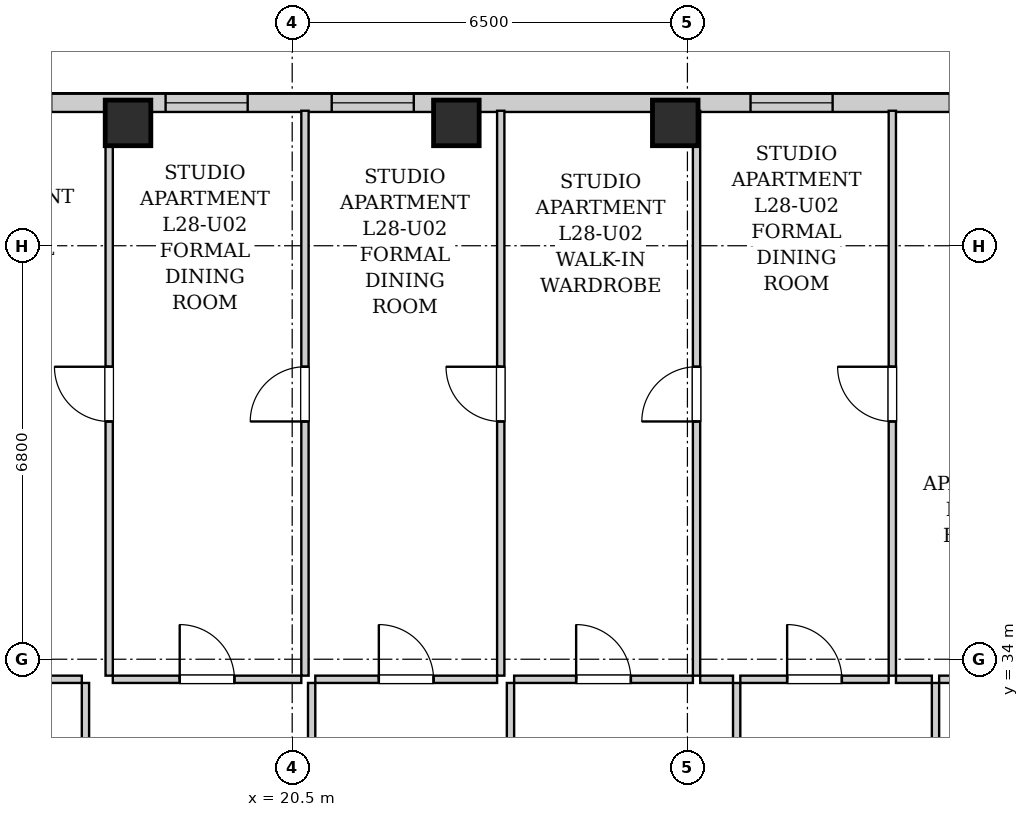
"""IFC4 building model, lengths in metres.
Left out: names, types, materials, properties, quantities, classifications, styles, units other than length and angle.
Written with IfcOpenShell. Run it as: python <this file> out.ifc"""

import sys

from ifc_helpers import new_model, si_unit, direction, frame, frame_2d, origin, origin_2d, place, context, subcontext, project, spatial, rectangle, extrude, element, fill, save


model = new_model("IFC4")
c1 = context("Model", 3, precision=1e-05, world=origin(), true_north=direction((0.0, 1.0)))
c2 = subcontext(c1, "Body", "Model", "MODEL_VIEW")
j1 = project(units=[si_unit("LENGTHUNIT", "METRE"), si_unit("PLANEANGLEUNIT", "RADIAN")], contexts=[c1])
p1 = place(None, origin())
s1 = spatial("IfcSite", under=j1, at=p1, CompositionType="ELEMENT")
p2 = place(p1, origin())
s2 = spatial("IfcBuilding", under=s1, at=p2, CompositionType="ELEMENT")
p3 = place(p2, frame((0.0, 0.0, 100.7)))
s3 = spatial("IfcBuildingStorey", under=s2, at=p3, CompositionType="ELEMENT", Elevation=100.7)
for number, where, z_axis, x_axis in (
    (1, (17.8, 42.82, 0.0), (0.0, 0.0, 1.0), (1.0, 0.0, 0.0)),
    (2, (23.2, 42.82, 0.0), (0.0, 0.0, 1.0), (1.0, 0.0, 0.0)),
    (3, (26.8, 42.82, 0.0), (0.0, 0.0, 1.0), (1.0, 0.0, 0.0)),
):
    element("IfcColumn", number, at=place(p3, frame(where, z_axis=z_axis, x_axis=x_axis)), inside=s3, PredefinedType="COLUMN", context=c2, shape_type="SweptSolid", body=[
        extrude(rectangle(XDim=0.75, YDim=0.75, at=origin_2d()), origin(), (0.0, 0.0, 1.0), 3.2),
    ])
p4 = place(p3, frame((10.0, 43.15, 0.0), z_axis=(0.0, 0.0, 1.0), x_axis=(1.0, 0.0, 0.0)))
e4 = element("IfcWall", 4, at=p4, inside=s3, PredefinedType="SOLIDWALL", context=c2, shape_type="SweptSolid", body=[
    extrude(rectangle(XDim=24.35, YDim=0.3, at=frame_2d((12.175, 0.0))), origin(), (0.0, 0.0, 1.0), 2.94),
])
p5 = place(p4, frame((1.956, 0.0, 0.55)))
e5 = element("IfcOpeningElement", 5, at=p5, cuts=e4, PredefinedType="OPENING", context=c2, shape_type="SweptSolid", body=[
    extrude(rectangle(XDim=1.35, YDim=1.2, at=frame_2d((0.675, 0.6))), frame((0.0, 0.16, 0.0), z_axis=(0.0, -1.0, 0.0), x_axis=(1.0, 0.0, 0.0)), (0.0, 0.0, 1.0), 0.32),
])
p6 = place(p4, frame((5.187, 0.0, 0.55)))
e6 = element("IfcOpeningElement", 6, at=p6, cuts=e4, PredefinedType="OPENING", context=c2, shape_type="SweptSolid", body=[
    extrude(rectangle(XDim=1.35, YDim=1.2, at=frame_2d((0.675, 0.6))), frame((0.0, 0.16, 0.0), z_axis=(0.0, -1.0, 0.0), x_axis=(1.0, 0.0, 0.0)), (0.0, 0.0, 1.0), 0.32),
])
p7 = place(p4, frame((8.418, 0.0, 0.55)))
e7 = element("IfcOpeningElement", 7, at=p7, cuts=e4, PredefinedType="OPENING", context=c2, shape_type="SweptSolid", body=[
    extrude(rectangle(XDim=1.35, YDim=1.2, at=frame_2d((0.675, 0.6))), frame((0.0, 0.16, 0.0), z_axis=(0.0, -1.0, 0.0), x_axis=(1.0, 0.0, 0.0)), (0.0, 0.0, 1.0), 0.32),
])
p8 = place(p4, frame((11.15, 0.0, 0.55)))
e8 = element("IfcOpeningElement", 8, at=p8, cuts=e4, PredefinedType="OPENING", context=c2, shape_type="SweptSolid", body=[
    extrude(rectangle(XDim=1.35, YDim=1.2, at=frame_2d((0.675, 0.6))), frame((0.0, 0.16, 0.0), z_axis=(0.0, -1.0, 0.0), x_axis=(1.0, 0.0, 0.0)), (0.0, 0.0, 1.0), 0.32),
])
p9 = place(p4, frame((18.038, 0.0, 0.55)))
e9 = element("IfcOpeningElement", 9, at=p9, cuts=e4, PredefinedType="OPENING", context=c2, shape_type="SweptSolid", body=[
    extrude(rectangle(XDim=1.35, YDim=1.2, at=frame_2d((0.675, 0.6))), frame((0.0, 0.16, 0.0), z_axis=(0.0, -1.0, 0.0), x_axis=(1.0, 0.0, 0.0)), (0.0, 0.0, 1.0), 0.32),
])
p10 = place(p4, frame((21.315, 0.0, 0.55)))
e10 = element("IfcOpeningElement", 10, at=p10, cuts=e4, PredefinedType="OPENING", context=c2, shape_type="SweptSolid", body=[
    extrude(rectangle(XDim=1.35, YDim=1.2, at=frame_2d((0.675, 0.6))), frame((0.0, 0.16, 0.0), z_axis=(0.0, -1.0, 0.0), x_axis=(1.0, 0.0, 0.0)), (0.0, 0.0, 1.0), 0.32),
])
p11 = place(p3, frame((17.1, 30.76, 0.0), z_axis=(0.0, 0.0, 1.0), x_axis=(0.0, 1.0, 0.0)))
e11 = element("IfcWall", 11, at=p11, inside=s3, PredefinedType="PARTITIONING", context=c2, shape_type="SweptSolid", body=[
    extrude(rectangle(XDim=2.85, YDim=0.12, at=frame_2d((1.425, 0.0))), origin(), (0.0, 0.0, 1.0), 2.94),
])
p12 = place(p11, frame((0.975, 0.0, 0.0)))
e12 = element("IfcOpeningElement", 12, at=p12, cuts=e11, PredefinedType="OPENING", context=c2, shape_type="SweptSolid", body=[
    extrude(rectangle(XDim=0.9, YDim=2.05, at=frame_2d((0.45, 1.025))), frame((0.0, 0.07, 0.0), z_axis=(0.0, -1.0, 0.0), x_axis=(1.0, 0.0, 0.0)), (0.0, 0.0, 1.0), 0.14),
])
p13 = place(p3, frame((14.33, 33.67, 0.0), z_axis=(0.0, 0.0, 1.0), x_axis=(1.0, 0.0, 0.0)))
e13 = element("IfcWall", 13, at=p13, inside=s3, PredefinedType="PARTITIONING", context=c2, shape_type="SweptSolid", body=[
    extrude(rectangle(XDim=2.71, YDim=0.12, at=frame_2d((1.355, 0.0))), origin(), (0.0, 0.0, 1.0), 2.94),
])
p14 = place(p13, frame((0.905, 0.0, 0.0)))
e14 = element("IfcOpeningElement", 14, at=p14, cuts=e13, PredefinedType="OPENING", context=c2, shape_type="SweptSolid", body=[
    extrude(rectangle(XDim=0.9, YDim=2.05, at=frame_2d((0.45, 1.025))), frame((0.0, 0.07, 0.0), z_axis=(0.0, -1.0, 0.0), x_axis=(1.0, 0.0, 0.0)), (0.0, 0.0, 1.0), 0.14),
])
p15 = place(p3, frame((20.82, 30.76, 0.0), z_axis=(0.0, 0.0, 1.0), x_axis=(0.0, 1.0, 0.0)))
e15 = element("IfcWall", 15, at=p15, inside=s3, PredefinedType="PARTITIONING", context=c2, shape_type="SweptSolid", body=[
    extrude(rectangle(XDim=2.85, YDim=0.12, at=frame_2d((1.425, 0.0))), origin(), (0.0, 0.0, 1.0), 2.94),
])
p16 = place(p15, frame((0.975, 0.0, 0.0)))
e16 = element("IfcOpeningElement", 16, at=p16, cuts=e15, PredefinedType="OPENING", context=c2, shape_type="SweptSolid", body=[
    extrude(rectangle(XDim=0.9, YDim=2.05, at=frame_2d((0.45, 1.025))), frame((0.0, 0.07, 0.0), z_axis=(0.0, -1.0, 0.0), x_axis=(1.0, 0.0, 0.0)), (0.0, 0.0, 1.0), 0.14),
])
p17 = place(p3, frame((17.55, 33.67, 0.0), z_axis=(0.0, 0.0, 1.0), x_axis=(1.0, 0.0, 0.0)))
e17 = element("IfcWall", 17, at=p17, inside=s3, PredefinedType="PARTITIONING", context=c2, shape_type="SweptSolid", body=[
    extrude(rectangle(XDim=3.1, YDim=0.12, at=frame_2d((1.55, 0.0))), origin(), (0.0, 0.0, 1.0), 2.94),
])
p18 = place(p17, frame((1.1, 0.0, 0.0)))
e18 = element("IfcOpeningElement", 18, at=p18, cuts=e17, PredefinedType="OPENING", context=c2, shape_type="SweptSolid", body=[
    extrude(rectangle(XDim=0.9, YDim=2.05, at=frame_2d((0.45, 1.025))), frame((0.0, 0.07, 0.0), z_axis=(0.0, -1.0, 0.0), x_axis=(1.0, 0.0, 0.0)), (0.0, 0.0, 1.0), 0.14),
])
p19 = place(p3, frame((24.09, 30.76, 0.0), z_axis=(0.0, 0.0, 1.0), x_axis=(0.0, 1.0, 0.0)))
e19 = element("IfcWall", 19, at=p19, inside=s3, PredefinedType="PARTITIONING", context=c2, shape_type="SweptSolid", body=[
    extrude(rectangle(XDim=2.85, YDim=0.12, at=frame_2d((1.425, 0.0))), origin(), (0.0, 0.0, 1.0), 2.94),
])
p20 = place(p19, frame((0.975, 0.0, 0.0)))
e20 = element("IfcOpeningElement", 20, at=p20, cuts=e19, PredefinedType="OPENING", context=c2, shape_type="SweptSolid", body=[
    extrude(rectangle(XDim=0.9, YDim=2.05, at=frame_2d((0.45, 1.025))), frame((0.0, 0.07, 0.0), z_axis=(0.0, -1.0, 0.0), x_axis=(1.0, 0.0, 0.0)), (0.0, 0.0, 1.0), 0.14),
])
p21 = place(p3, frame((20.88, 33.67, 0.0), z_axis=(0.0, 0.0, 1.0), x_axis=(1.0, 0.0, 0.0)))
e21 = element("IfcWall", 21, at=p21, inside=s3, PredefinedType="PARTITIONING", context=c2, shape_type="SweptSolid", body=[
    extrude(rectangle(XDim=2.99, YDim=0.12, at=frame_2d((1.495, 0.0))), origin(), (0.0, 0.0, 1.0), 2.94),
])
p22 = place(p21, frame((1.045, 0.0, 0.0)))
e22 = element("IfcOpeningElement", 22, at=p22, cuts=e21, PredefinedType="OPENING", context=c2, shape_type="SweptSolid", body=[
    extrude(rectangle(XDim=0.9, YDim=2.05, at=frame_2d((0.45, 1.025))), frame((0.0, 0.07, 0.0), z_axis=(0.0, -1.0, 0.0), x_axis=(1.0, 0.0, 0.0)), (0.0, 0.0, 1.0), 0.14),
])
p23 = place(p3, frame((27.81, 30.76, 0.0), z_axis=(0.0, 0.0, 1.0), x_axis=(0.0, 1.0, 0.0)))
e23 = element("IfcWall", 23, at=p23, inside=s3, PredefinedType="PARTITIONING", context=c2, shape_type="SweptSolid", body=[
    extrude(rectangle(XDim=2.85, YDim=0.12, at=frame_2d((1.425, 0.0))), origin(), (0.0, 0.0, 1.0), 2.94),
])
p24 = place(p23, frame((0.975, 0.0, 0.0)))
e24 = element("IfcOpeningElement", 24, at=p24, cuts=e23, PredefinedType="OPENING", context=c2, shape_type="SweptSolid", body=[
    extrude(rectangle(XDim=0.9, YDim=2.05, at=frame_2d((0.45, 1.025))), frame((0.0, 0.07, 0.0), z_axis=(0.0, -1.0, 0.0), x_axis=(1.0, 0.0, 0.0)), (0.0, 0.0, 1.0), 0.14),
])
p25 = place(p3, frame((24.15, 33.67, 0.0), z_axis=(0.0, 0.0, 1.0), x_axis=(1.0, 0.0, 0.0)))
e25 = element("IfcWall", 25, at=p25, inside=s3, PredefinedType="PARTITIONING", context=c2, shape_type="SweptSolid", body=[
    extrude(rectangle(XDim=2.94, YDim=0.12, at=frame_2d((1.47, 0.0))), origin(), (0.0, 0.0, 1.0), 2.94),
])
p26 = place(p25, frame((1.02, 0.0, 0.0)))
e26 = element("IfcOpeningElement", 26, at=p26, cuts=e25, PredefinedType="OPENING", context=c2, shape_type="SweptSolid", body=[
    extrude(rectangle(XDim=0.9, YDim=2.05, at=frame_2d((0.45, 1.025))), frame((0.0, 0.07, 0.0), z_axis=(0.0, -1.0, 0.0), x_axis=(1.0, 0.0, 0.0)), (0.0, 0.0, 1.0), 0.14),
])
p27 = place(p3, frame((27.21, 33.67, 0.0), z_axis=(0.0, 0.0, 1.0), x_axis=(1.0, 0.0, 0.0)))
e27 = element("IfcWall", 27, at=p27, inside=s3, PredefinedType="PARTITIONING", context=c2, shape_type="SweptSolid", body=[
    extrude(rectangle(XDim=0.54, YDim=0.12, at=frame_2d((0.27, 0.0))), origin(), (0.0, 0.0, 1.0), 2.94),
])
p28 = place(p3, frame((31.08, 30.76, 0.0), z_axis=(0.0, 0.0, 1.0), x_axis=(0.0, 1.0, 0.0)))
e28 = element("IfcWall", 28, at=p28, inside=s3, PredefinedType="PARTITIONING", context=c2, shape_type="SweptSolid", body=[
    extrude(rectangle(XDim=2.85, YDim=0.12, at=frame_2d((1.425, 0.0))), origin(), (0.0, 0.0, 1.0), 2.94),
])
p29 = place(p28, frame((0.975, 0.0, 0.0)))
e29 = element("IfcOpeningElement", 29, at=p29, cuts=e28, PredefinedType="OPENING", context=c2, shape_type="SweptSolid", body=[
    extrude(rectangle(XDim=0.9, YDim=2.05, at=frame_2d((0.45, 1.025))), frame((0.0, 0.07, 0.0), z_axis=(0.0, -1.0, 0.0), x_axis=(1.0, 0.0, 0.0)), (0.0, 0.0, 1.0), 0.14),
])
p30 = place(p3, frame((27.87, 33.67, 0.0), z_axis=(0.0, 0.0, 1.0), x_axis=(1.0, 0.0, 0.0)))
e30 = element("IfcWall", 30, at=p30, inside=s3, PredefinedType="PARTITIONING", context=c2, shape_type="SweptSolid", body=[
    extrude(rectangle(XDim=2.44, YDim=0.12, at=frame_2d((1.22, 0.0))), origin(), (0.0, 0.0, 1.0), 2.94),
])
p31 = place(p30, frame((0.77, 0.0, 0.0)))
e31 = element("IfcOpeningElement", 31, at=p31, cuts=e30, PredefinedType="OPENING", context=c2, shape_type="SweptSolid", body=[
    extrude(rectangle(XDim=0.9, YDim=2.05, at=frame_2d((0.45, 1.025))), frame((0.0, 0.07, 0.0), z_axis=(0.0, -1.0, 0.0), x_axis=(1.0, 0.0, 0.0)), (0.0, 0.0, 1.0), 0.14),
])
p32 = place(p3, frame((30.43, 33.67, 0.0), z_axis=(0.0, 0.0, 1.0), x_axis=(1.0, 0.0, 0.0)))
e32 = element("IfcWall", 32, at=p32, inside=s3, PredefinedType="PARTITIONING", context=c2, shape_type="SweptSolid", body=[
    extrude(rectangle(XDim=0.59, YDim=0.12, at=frame_2d((0.295, 0.0))), origin(), (0.0, 0.0, 1.0), 2.94),
])
p33 = place(p3, frame((31.14, 33.67, 0.0), z_axis=(0.0, 0.0, 1.0), x_axis=(1.0, 0.0, 0.0)))
e33 = element("IfcWall", 33, at=p33, inside=s3, PredefinedType="PARTITIONING", context=c2, shape_type="SweptSolid", body=[
    extrude(rectangle(XDim=2.39, YDim=0.12, at=frame_2d((1.195, 0.0))), origin(), (0.0, 0.0, 1.0), 2.94),
])
p34 = place(p33, frame((0.745, 0.0, 0.0)))
e34 = element("IfcOpeningElement", 34, at=p34, cuts=e33, PredefinedType="OPENING", context=c2, shape_type="SweptSolid", body=[
    extrude(rectangle(XDim=0.9, YDim=2.05, at=frame_2d((0.45, 1.025))), frame((0.0, 0.07, 0.0), z_axis=(0.0, -1.0, 0.0), x_axis=(1.0, 0.0, 0.0)), (0.0, 0.0, 1.0), 0.14),
])
p35 = place(p3, frame((17.49, 33.73, 0.0), z_axis=(0.0, 0.0, 1.0), x_axis=(0.0, 1.0, 0.0)))
e35 = element("IfcWall", 35, at=p35, inside=s3, PredefinedType="PARTITIONING", context=c2, shape_type="SweptSolid", body=[
    extrude(rectangle(XDim=9.29, YDim=0.12, at=frame_2d((4.645, 0.0))), origin(), (0.0, 0.0, 1.0), 2.94),
])
p36 = place(p35, frame((4.18, 0.0, 0.0)))
e36 = element("IfcOpeningElement", 36, at=p36, cuts=e35, PredefinedType="OPENING", context=c2, shape_type="SweptSolid", body=[
    extrude(rectangle(XDim=0.9, YDim=2.05, at=frame_2d((0.45, 1.025))), frame((0.0, 0.07, 0.0), z_axis=(0.0, -1.0, 0.0), x_axis=(1.0, 0.0, 0.0)), (0.0, 0.0, 1.0), 0.14),
])
p37 = place(p3, frame((20.71, 33.73, 0.0), z_axis=(0.0, 0.0, 1.0), x_axis=(0.0, 1.0, 0.0)))
e37 = element("IfcWall", 37, at=p37, inside=s3, PredefinedType="PARTITIONING", context=c2, shape_type="SweptSolid", body=[
    extrude(rectangle(XDim=9.29, YDim=0.12, at=frame_2d((4.645, 0.0))), origin(), (0.0, 0.0, 1.0), 2.94),
])
p38 = place(p37, frame((4.18, 0.0, 0.0)))
e38 = element("IfcOpeningElement", 38, at=p38, cuts=e37, PredefinedType="OPENING", context=c2, shape_type="SweptSolid", body=[
    extrude(rectangle(XDim=0.9, YDim=2.05, at=frame_2d((0.45, 1.025))), frame((0.0, 0.07, 0.0), z_axis=(0.0, -1.0, 0.0), x_axis=(1.0, 0.0, 0.0)), (0.0, 0.0, 1.0), 0.14),
])
p39 = place(p3, frame((23.93, 33.73, 0.0), z_axis=(0.0, 0.0, 1.0), x_axis=(0.0, 1.0, 0.0)))
e39 = element("IfcWall", 39, at=p39, inside=s3, PredefinedType="PARTITIONING", context=c2, shape_type="SweptSolid", body=[
    extrude(rectangle(XDim=9.29, YDim=0.12, at=frame_2d((4.645, 0.0))), origin(), (0.0, 0.0, 1.0), 2.94),
])
p40 = place(p39, frame((4.18, 0.0, 0.0)))
e40 = element("IfcOpeningElement", 40, at=p40, cuts=e39, PredefinedType="OPENING", context=c2, shape_type="SweptSolid", body=[
    extrude(rectangle(XDim=0.9, YDim=2.05, at=frame_2d((0.45, 1.025))), frame((0.0, 0.07, 0.0), z_axis=(0.0, -1.0, 0.0), x_axis=(1.0, 0.0, 0.0)), (0.0, 0.0, 1.0), 0.14),
])
p41 = place(p3, frame((27.15, 33.73, 0.0), z_axis=(0.0, 0.0, 1.0), x_axis=(0.0, 1.0, 0.0)))
e41 = element("IfcWall", 41, at=p41, inside=s3, PredefinedType="PARTITIONING", context=c2, shape_type="SweptSolid", body=[
    extrude(rectangle(XDim=9.29, YDim=0.12, at=frame_2d((4.645, 0.0))), origin(), (0.0, 0.0, 1.0), 2.94),
])
p42 = place(p41, frame((4.18, 0.0, 0.0)))
e42 = element("IfcOpeningElement", 42, at=p42, cuts=e41, PredefinedType="OPENING", context=c2, shape_type="SweptSolid", body=[
    extrude(rectangle(XDim=0.9, YDim=2.05, at=frame_2d((0.45, 1.025))), frame((0.0, 0.07, 0.0), z_axis=(0.0, -1.0, 0.0), x_axis=(1.0, 0.0, 0.0)), (0.0, 0.0, 1.0), 0.14),
])
p43 = place(p3, frame((30.37, 33.73, 0.0), z_axis=(0.0, 0.0, 1.0), x_axis=(0.0, 1.0, 0.0)))
e43 = element("IfcWall", 43, at=p43, inside=s3, PredefinedType="PARTITIONING", context=c2, shape_type="SweptSolid", body=[
    extrude(rectangle(XDim=9.29, YDim=0.12, at=frame_2d((4.645, 0.0))), origin(), (0.0, 0.0, 1.0), 2.94),
])
p44 = place(p43, frame((4.18, 0.0, 0.0)))
e44 = element("IfcOpeningElement", 44, at=p44, cuts=e43, PredefinedType="OPENING", context=c2, shape_type="SweptSolid", body=[
    extrude(rectangle(XDim=0.9, YDim=2.05, at=frame_2d((0.45, 1.025))), frame((0.0, 0.07, 0.0), z_axis=(0.0, -1.0, 0.0), x_axis=(1.0, 0.0, 0.0)), (0.0, 0.0, 1.0), 0.14),
])
p45 = place(p18, origin())
e45 = element("IfcDoor", 45, at=p45, inside=s3, OperationType="SINGLE_SWING_LEFT", PredefinedType="DOOR", context=c2, shape_type="SweptSolid", body=[
    extrude(rectangle(XDim=0.9, YDim=2.05, at=frame_2d((0.45, 1.025))), frame((0.0, 0.025, 0.0), z_axis=(0.0, -1.0, 0.0), x_axis=(1.0, 0.0, 0.0)), (0.0, 0.0, 1.0), 0.05),
])
fill(e18, e45)
p46 = place(p22, origin())
e46 = element("IfcDoor", 46, at=p46, inside=s3, OperationType="SINGLE_SWING_LEFT", PredefinedType="DOOR", context=c2, shape_type="SweptSolid", body=[
    extrude(rectangle(XDim=0.9, YDim=2.05, at=frame_2d((0.45, 1.025))), frame((0.0, 0.025, 0.0), z_axis=(0.0, -1.0, 0.0), x_axis=(1.0, 0.0, 0.0)), (0.0, 0.0, 1.0), 0.05),
])
fill(e22, e46)
p47 = place(p26, origin())
e47 = element("IfcDoor", 47, at=p47, inside=s3, OperationType="SINGLE_SWING_LEFT", PredefinedType="DOOR", context=c2, shape_type="SweptSolid", body=[
    extrude(rectangle(XDim=0.9, YDim=2.05, at=frame_2d((0.45, 1.025))), frame((0.0, 0.025, 0.0), z_axis=(0.0, -1.0, 0.0), x_axis=(1.0, 0.0, 0.0)), (0.0, 0.0, 1.0), 0.05),
])
fill(e26, e47)
p48 = place(p31, origin())
e48 = element("IfcDoor", 48, at=p48, inside=s3, OperationType="SINGLE_SWING_LEFT", PredefinedType="DOOR", context=c2, shape_type="SweptSolid", body=[
    extrude(rectangle(XDim=0.9, YDim=2.05, at=frame_2d((0.45, 1.025))), frame((0.0, 0.025, 0.0), z_axis=(0.0, -1.0, 0.0), x_axis=(1.0, 0.0, 0.0)), (0.0, 0.0, 1.0), 0.05),
])
fill(e31, e48)
p49 = place(p36, origin())
e49 = element("IfcDoor", 49, at=p49, inside=s3, OperationType="SINGLE_SWING_RIGHT", PredefinedType="DOOR", context=c2, shape_type="SweptSolid", body=[
    extrude(rectangle(XDim=0.9, YDim=2.05, at=frame_2d((0.45, 1.025))), frame((0.0, 0.025, 0.0), z_axis=(0.0, -1.0, 0.0), x_axis=(1.0, 0.0, 0.0)), (0.0, 0.0, 1.0), 0.05),
])
fill(e36, e49)
p50 = place(p38, origin())
e50 = element("IfcDoor", 50, at=p50, inside=s3, OperationType="SINGLE_SWING_LEFT", PredefinedType="DOOR", context=c2, shape_type="SweptSolid", body=[
    extrude(rectangle(XDim=0.9, YDim=2.05, at=frame_2d((0.45, 1.025))), frame((0.0, 0.025, 0.0), z_axis=(0.0, -1.0, 0.0), x_axis=(1.0, 0.0, 0.0)), (0.0, 0.0, 1.0), 0.05),
])
fill(e38, e50)
p51 = place(p40, origin())
e51 = element("IfcDoor", 51, at=p51, inside=s3, OperationType="SINGLE_SWING_RIGHT", PredefinedType="DOOR", context=c2, shape_type="SweptSolid", body=[
    extrude(rectangle(XDim=0.9, YDim=2.05, at=frame_2d((0.45, 1.025))), frame((0.0, 0.025, 0.0), z_axis=(0.0, -1.0, 0.0), x_axis=(1.0, 0.0, 0.0)), (0.0, 0.0, 1.0), 0.05),
])
fill(e40, e51)
p52 = place(p42, origin())
e52 = element("IfcDoor", 52, at=p52, inside=s3, OperationType="SINGLE_SWING_LEFT", PredefinedType="DOOR", context=c2, shape_type="SweptSolid", body=[
    extrude(rectangle(XDim=0.9, YDim=2.05, at=frame_2d((0.45, 1.025))), frame((0.0, 0.025, 0.0), z_axis=(0.0, -1.0, 0.0), x_axis=(1.0, 0.0, 0.0)), (0.0, 0.0, 1.0), 0.05),
])
fill(e42, e52)
p53 = place(p44, origin())
e53 = element("IfcDoor", 53, at=p53, inside=s3, OperationType="SINGLE_SWING_RIGHT", PredefinedType="DOOR", context=c2, shape_type="SweptSolid", body=[
    extrude(rectangle(XDim=0.9, YDim=2.05, at=frame_2d((0.45, 1.025))), frame((0.0, 0.025, 0.0), z_axis=(0.0, -1.0, 0.0), x_axis=(1.0, 0.0, 0.0)), (0.0, 0.0, 1.0), 0.05),
])
fill(e44, e53)
p54 = place(p7, origin())
e54 = element("IfcWindow", 54, at=p54, inside=s3, PartitioningType="SINGLE_PANEL", PredefinedType="WINDOW", context=c2, shape_type="SweptSolid", body=[
    extrude(rectangle(XDim=1.35, YDim=1.2, at=frame_2d((0.675, 0.6))), frame((0.0, 0.03, 0.0), z_axis=(0.0, -1.0, 0.0), x_axis=(1.0, 0.0, 0.0)), (0.0, 0.0, 1.0), 0.06),
])
fill(e7, e54)
p55 = place(p8, origin())
e55 = element("IfcWindow", 55, at=p55, inside=s3, PartitioningType="SINGLE_PANEL", PredefinedType="WINDOW", context=c2, shape_type="SweptSolid", body=[
    extrude(rectangle(XDim=1.35, YDim=1.2, at=frame_2d((0.675, 0.6))), frame((0.0, 0.03, 0.0), z_axis=(0.0, -1.0, 0.0), x_axis=(1.0, 0.0, 0.0)), (0.0, 0.0, 1.0), 0.06),
])
fill(e8, e55)
p56 = place(p9, origin())
e56 = element("IfcWindow", 56, at=p56, inside=s3, PartitioningType="SINGLE_PANEL", PredefinedType="WINDOW", context=c2, shape_type="SweptSolid", body=[
    extrude(rectangle(XDim=1.35, YDim=1.2, at=frame_2d((0.675, 0.6))), frame((0.0, 0.03, 0.0), z_axis=(0.0, -1.0, 0.0), x_axis=(1.0, 0.0, 0.0)), (0.0, 0.0, 1.0), 0.06),
])
fill(e9, e56)
save(model, sys.argv[1])
